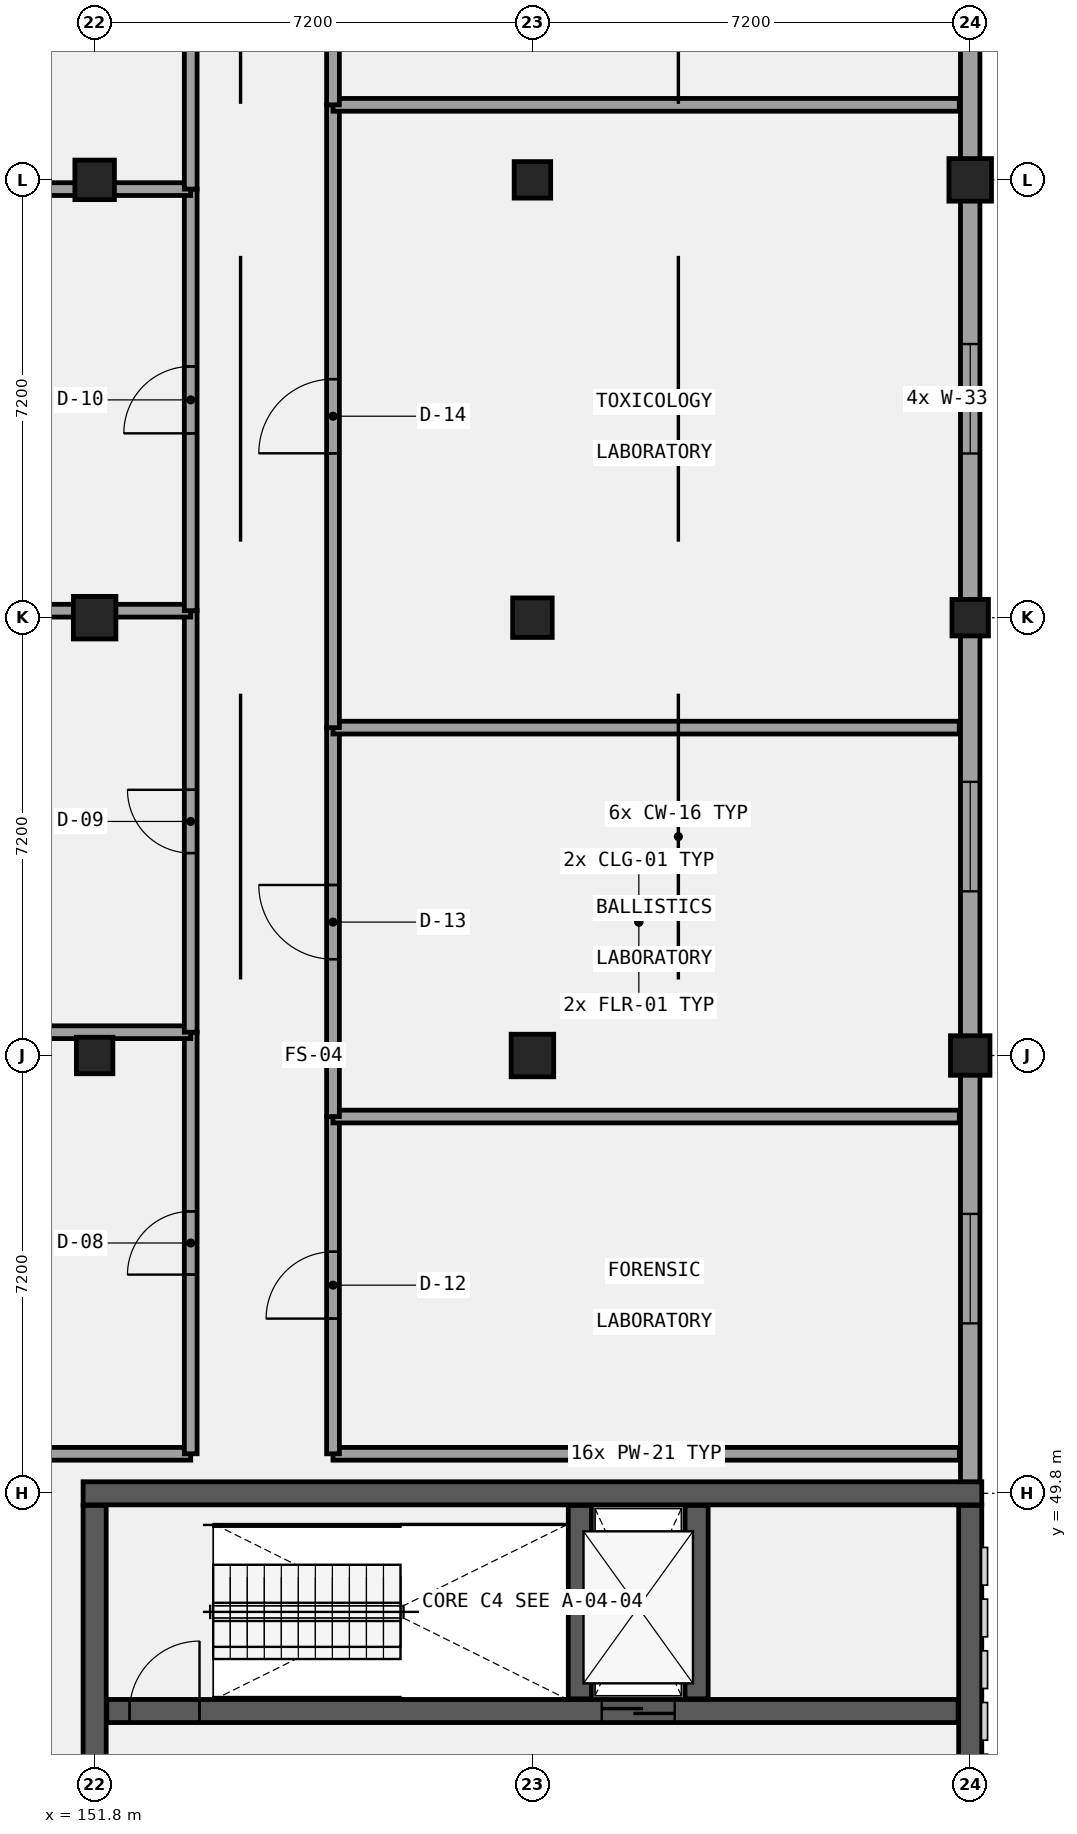
"""IFC4 building model, lengths in metres.
Left out: names, types, materials, properties, quantities, classifications, styles, units other than length and angle.
Written with IfcOpenShell. Run it as: python <this file> out.ifc"""

import sys

from ifc_helpers import new_model, si_unit, direction, frame, frame_2d, origin, origin_2d, place, context, subcontext, project, spatial, rectangle, extrude, element, fill, save


model = new_model("IFC4")
c1 = context("Model", 3, precision=1e-05, world=origin(), true_north=direction((0.0, 1.0)))
c2 = subcontext(c1, "Body", "Model", "MODEL_VIEW")
j1 = project(units=[si_unit("LENGTHUNIT", "METRE"), si_unit("PLANEANGLEUNIT", "RADIAN")], contexts=[c1])
p1 = place(None, origin())
s1 = spatial("IfcSite", under=j1, at=p1, CompositionType="ELEMENT")
p2 = place(p1, origin())
s2 = spatial("IfcBuilding", under=s1, at=p2, CompositionType="ELEMENT")
p3 = place(p2, frame((0.0, 0.0, 9.6)))
s3 = spatial("IfcBuildingStorey", under=s2, at=p3, CompositionType="ELEMENT", Elevation=9.6)
p4 = place(p3, frame((151.61, 49.8, 0.0), z_axis=(0.0, 0.0, 1.0), x_axis=(1.0, 0.0, 0.0)))
e1 = element("IfcWall", 1, at=p4, inside=s3, PredefinedType="SHEAR", context=c2, shape_type="SweptSolid", body=[
    extrude(rectangle(XDim=14.78, YDim=0.38, at=frame_2d((7.39, 0.0))), origin(), (0.0, 0.0, 1.0), 4.2),
])
for number, where, z_axis, x_axis in (
    (2, (151.8, 42.8, 0.0), (0.0, 0.0, 1.0), (0.0, 1.0, 0.0)),
    (3, (166.2, 42.8, 0.0), (0.0, 0.0, 1.0), (0.0, 1.0, 0.0)),
):
    element("IfcWall", number, at=place(p3, frame(where, z_axis=z_axis, x_axis=x_axis)), inside=s3, PredefinedType="SHEAR", context=c2, shape_type="SweptSolid", body=[
        extrude(rectangle(XDim=6.8, YDim=0.38, at=frame_2d((3.4, 0.0))), origin(), (0.0, 0.0, 1.0), 4.2),
    ])
p5 = place(p3, frame((152.0, 46.22, 0.0), z_axis=(0.0, 0.0, 1.0), x_axis=(1.0, 0.0, 0.0)))
e4 = element("IfcWall", 4, at=p5, inside=s3, PredefinedType="SHEAR", context=c2, shape_type="SweptSolid", body=[
    extrude(rectangle(XDim=14.0, YDim=0.38, at=frame_2d((7.0, 0.0))), origin(), (0.0, 0.0, 1.0), 4.2),
])
p6 = place(p5, frame((8.14, 0.0, 0.0)))
e5 = element("IfcOpeningElement", 5, at=p6, cuts=e4, PredefinedType="OPENING", context=c2, shape_type="SweptSolid", body=[
    extrude(rectangle(XDim=1.2, YDim=2.15, at=frame_2d((0.6, 1.075))), frame((0.0, 0.2, 0.0), z_axis=(0.0, -1.0, 0.0), x_axis=(1.0, 0.0, 0.0)), (0.0, 0.0, 1.0), 0.4),
])
p7 = place(p5, frame((0.375, 0.0, 0.0)))
e6 = element("IfcOpeningElement", 6, at=p7, cuts=e4, PredefinedType="OPENING", context=c2, shape_type="SweptSolid", body=[
    extrude(rectangle(XDim=1.15, YDim=2.15, at=frame_2d((0.575, 1.075))), frame((0.0, 0.2, 0.0), z_axis=(0.0, -1.0, 0.0), x_axis=(1.0, 0.0, 0.0)), (0.0, 0.0, 1.0), 0.4),
])
for number, where, z_axis, x_axis in (
    (7, (159.78, 46.42, 0.0), (0.0, 0.0, 1.0), (0.0, 1.0, 0.0)),
    (8, (161.7, 46.42, 0.0), (0.0, 0.0, 1.0), (0.0, 1.0, 0.0)),
):
    element("IfcWall", number, at=place(p3, frame(where, z_axis=z_axis, x_axis=x_axis)), inside=s3, PredefinedType="SHEAR", context=c2, shape_type="SweptSolid", body=[
        extrude(rectangle(XDim=3.18, YDim=0.38, at=frame_2d((1.59, 0.0))), origin(), (0.0, 0.0, 1.0), 4.2),
    ])
p8 = place(p3, frame((151.8, 57.0, 0.0), z_axis=(0.0, 0.0, 1.0), x_axis=(1.0, 0.0, 0.0)))
e9 = element("IfcColumn", 9, at=p8, inside=s3, PredefinedType="COLUMN", context=c2, shape_type="SweptSolid", body=[
    extrude(rectangle(XDim=0.6, YDim=0.6, at=origin_2d()), origin(), (0.0, 0.0, 1.0), 4.2),
])
p9 = place(p3, frame((151.8, 64.2, 0.0), z_axis=(0.0, 0.0, 1.0), x_axis=(1.0, 0.0, 0.0)))
e10 = element("IfcColumn", 10, at=p9, inside=s3, PredefinedType="COLUMN", context=c2, shape_type="SweptSolid", body=[
    extrude(rectangle(XDim=0.7, YDim=0.7, at=origin_2d()), origin(), (0.0, 0.0, 1.0), 4.2),
])
p10 = place(p3, frame((151.8, 71.4, 0.0), z_axis=(0.0, 0.0, 1.0), x_axis=(1.0, 0.0, 0.0)))
e11 = element("IfcColumn", 11, at=p10, inside=s3, PredefinedType="COLUMN", context=c2, shape_type="SweptSolid", body=[
    extrude(rectangle(XDim=0.65, YDim=0.65, at=origin_2d()), origin(), (0.0, 0.0, 1.0), 4.2),
])
p11 = place(p3, frame((159.0, 57.0, 0.0), z_axis=(0.0, 0.0, 1.0), x_axis=(1.0, 0.0, 0.0)))
e12 = element("IfcColumn", 12, at=p11, inside=s3, PredefinedType="COLUMN", context=c2, shape_type="SweptSolid", body=[
    extrude(rectangle(XDim=0.7, YDim=0.7, at=origin_2d()), origin(), (0.0, 0.0, 1.0), 4.2),
])
p12 = place(p3, frame((159.0, 64.2, 0.0), z_axis=(0.0, 0.0, 1.0), x_axis=(1.0, 0.0, 0.0)))
e13 = element("IfcColumn", 13, at=p12, inside=s3, PredefinedType="COLUMN", context=c2, shape_type="SweptSolid", body=[
    extrude(rectangle(XDim=0.65, YDim=0.65, at=origin_2d()), origin(), (0.0, 0.0, 1.0), 4.2),
])
p13 = place(p3, frame((159.0, 71.4, 0.0), z_axis=(0.0, 0.0, 1.0), x_axis=(1.0, 0.0, 0.0)))
e14 = element("IfcColumn", 14, at=p13, inside=s3, PredefinedType="COLUMN", context=c2, shape_type="SweptSolid", body=[
    extrude(rectangle(XDim=0.6, YDim=0.6, at=origin_2d()), origin(), (0.0, 0.0, 1.0), 4.2),
])
p14 = place(p3, frame((166.2, 57.0, 0.0), z_axis=(0.0, 0.0, 1.0), x_axis=(1.0, 0.0, 0.0)))
e15 = element("IfcColumn", 15, at=p14, inside=s3, PredefinedType="COLUMN", context=c2, shape_type="SweptSolid", body=[
    extrude(rectangle(XDim=0.65, YDim=0.65, at=origin_2d()), origin(), (0.0, 0.0, 1.0), 4.2),
])
p15 = place(p3, frame((166.2, 64.2, 0.0), z_axis=(0.0, 0.0, 1.0), x_axis=(1.0, 0.0, 0.0)))
e16 = element("IfcColumn", 16, at=p15, inside=s3, PredefinedType="COLUMN", context=c2, shape_type="SweptSolid", body=[
    extrude(rectangle(XDim=0.6, YDim=0.6, at=origin_2d()), origin(), (0.0, 0.0, 1.0), 4.2),
])
p16 = place(p3, frame((166.2, 71.4, 0.0), z_axis=(0.0, 0.0, 1.0), x_axis=(1.0, 0.0, 0.0)))
e17 = element("IfcColumn", 17, at=p16, inside=s3, PredefinedType="COLUMN", context=c2, shape_type="SweptSolid", body=[
    extrude(rectangle(XDim=0.7, YDim=0.7, at=origin_2d()), origin(), (0.0, 0.0, 1.0), 4.2),
])
p17 = place(p3, frame((166.2, 49.99, 0.0), z_axis=(0.0, 0.0, 1.0), x_axis=(0.0, 1.0, 0.0)))
e18 = element("IfcWall", 18, at=p17, inside=s3, PredefinedType="SOLIDWALL", context=c2, shape_type="SweptSolid", body=[
    extrude(rectangle(XDim=28.45, YDim=0.32, at=frame_2d((14.225, 0.0))), origin(), (0.0, 0.0, 1.0), 3.19),
])
p18 = place(p17, frame((2.605, 0.0, 1.0)))
e19 = element("IfcOpeningElement", 19, at=p18, cuts=e18, PredefinedType="OPENING", context=c2, shape_type="SweptSolid", body=[
    extrude(rectangle(XDim=1.8, YDim=1.9, at=frame_2d((0.9, 0.95))), frame((0.0, 0.17, 0.0), z_axis=(0.0, -1.0, 0.0), x_axis=(1.0, 0.0, 0.0)), (0.0, 0.0, 1.0), 0.34),
])
p19 = place(p17, frame((9.71, 0.0, 1.0)))
e20 = element("IfcOpeningElement", 20, at=p19, cuts=e18, PredefinedType="OPENING", context=c2, shape_type="SweptSolid", body=[
    extrude(rectangle(XDim=1.8, YDim=1.9, at=frame_2d((0.9, 0.95))), frame((0.0, 0.17, 0.0), z_axis=(0.0, -1.0, 0.0), x_axis=(1.0, 0.0, 0.0)), (0.0, 0.0, 1.0), 0.34),
])
p20 = place(p17, frame((16.91, 0.0, 1.0)))
e21 = element("IfcOpeningElement", 21, at=p20, cuts=e18, PredefinedType="OPENING", context=c2, shape_type="SweptSolid", body=[
    extrude(rectangle(XDim=1.8, YDim=1.9, at=frame_2d((0.9, 0.95))), frame((0.0, 0.17, 0.0), z_axis=(0.0, -1.0, 0.0), x_axis=(1.0, 0.0, 0.0)), (0.0, 0.0, 1.0), 0.34),
])
p21 = place(p17, frame((24.03, 0.0, 1.0)))
e22 = element("IfcOpeningElement", 22, at=p21, cuts=e18, PredefinedType="OPENING", context=c2, shape_type="SweptSolid", body=[
    extrude(rectangle(XDim=1.8, YDim=1.9, at=frame_2d((0.9, 0.95))), frame((0.0, 0.17, 0.0), z_axis=(0.0, -1.0, 0.0), x_axis=(1.0, 0.0, 0.0)), (0.0, 0.0, 1.0), 0.34),
])
p22 = place(p3, frame((144.78, 50.45, 0.0), z_axis=(0.0, 0.0, 1.0), x_axis=(1.0, 0.0, 0.0)))
e23 = element("IfcWall", 23, at=p22, inside=s3, PredefinedType="PARTITIONING", context=c2, shape_type="SweptSolid", body=[
    extrude(rectangle(XDim=8.6, YDim=0.21, at=frame_2d((4.3, 0.0))), origin(), (0.0, 0.0, 1.0), 3.94),
])
p23 = place(p3, frame((153.38, 50.45, 0.0), z_axis=(0.0, 0.0, 1.0), x_axis=(0.0, 1.0, 0.0)))
e24 = element("IfcWall", 24, at=p23, inside=s3, PredefinedType="PARTITIONING", context=c2, shape_type="SweptSolid", body=[
    extrude(rectangle(XDim=6.933, YDim=0.21, at=frame_2d((3.467, 0.0))), origin(), (0.0, 0.0, 1.0), 3.94),
])
p24 = place(p23, frame((2.947, 0.0, 0.0)))
e25 = element("IfcOpeningElement", 25, at=p24, cuts=e24, PredefinedType="OPENING", context=c2, shape_type="SweptSolid", body=[
    extrude(rectangle(XDim=1.04, YDim=2.22, at=frame_2d((0.52, 1.11))), frame((0.0, 0.115, 0.0), z_axis=(0.0, -1.0, 0.0), x_axis=(1.0, 0.0, 0.0)), (0.0, 0.0, 1.0), 0.23),
])
p25 = place(p3, frame((144.78, 57.383, 0.0), z_axis=(0.0, 0.0, 1.0), x_axis=(1.0, 0.0, 0.0)))
e26 = element("IfcWall", 26, at=p25, inside=s3, PredefinedType="PARTITIONING", context=c2, shape_type="SweptSolid", body=[
    extrude(rectangle(XDim=8.6, YDim=0.21, at=frame_2d((4.3, 0.0))), origin(), (0.0, 0.0, 1.0), 3.09),
])
p26 = place(p3, frame((153.38, 57.383, 0.0), z_axis=(0.0, 0.0, 1.0), x_axis=(0.0, 1.0, 0.0)))
e27 = element("IfcWall", 27, at=p26, inside=s3, PredefinedType="PARTITIONING", context=c2, shape_type="SweptSolid", body=[
    extrude(rectangle(XDim=6.932, YDim=0.21, at=frame_2d((3.466, 0.0))), origin(), (0.0, 0.0, 1.0), 3.94),
])
p27 = place(p26, frame((2.946, 0.0, 0.0)))
e28 = element("IfcOpeningElement", 28, at=p27, cuts=e27, PredefinedType="OPENING", context=c2, shape_type="SweptSolid", body=[
    extrude(rectangle(XDim=1.04, YDim=2.35, at=frame_2d((0.52, 1.175))), frame((0.0, 0.115, 0.0), z_axis=(0.0, -1.0, 0.0), x_axis=(1.0, 0.0, 0.0)), (0.0, 0.0, 1.0), 0.23),
])
p28 = place(p3, frame((144.78, 64.315, 0.0), z_axis=(0.0, 0.0, 1.0), x_axis=(1.0, 0.0, 0.0)))
e29 = element("IfcWall", 29, at=p28, inside=s3, PredefinedType="PARTITIONING", context=c2, shape_type="SweptSolid", body=[
    extrude(rectangle(XDim=8.6, YDim=0.21, at=frame_2d((4.3, 0.0))), origin(), (0.0, 0.0, 1.0), 3.04),
])
p29 = place(p3, frame((153.38, 64.315, 0.0), z_axis=(0.0, 0.0, 1.0), x_axis=(0.0, 1.0, 0.0)))
e30 = element("IfcWall", 30, at=p29, inside=s3, PredefinedType="PARTITIONING", context=c2, shape_type="SweptSolid", body=[
    extrude(rectangle(XDim=6.933, YDim=0.21, at=frame_2d((3.467, 0.0))), origin(), (0.0, 0.0, 1.0), 3.94),
])
p30 = place(p29, frame((2.917, 0.0, 0.0)))
e31 = element("IfcOpeningElement", 31, at=p30, cuts=e30, PredefinedType="OPENING", context=c2, shape_type="SweptSolid", body=[
    extrude(rectangle(XDim=1.1, YDim=2.1, at=frame_2d((0.55, 1.05))), frame((0.0, 0.115, 0.0), z_axis=(0.0, -1.0, 0.0), x_axis=(1.0, 0.0, 0.0)), (0.0, 0.0, 1.0), 0.23),
])
p31 = place(p3, frame((144.78, 71.248, 0.0), z_axis=(0.0, 0.0, 1.0), x_axis=(1.0, 0.0, 0.0)))
e32 = element("IfcWall", 32, at=p31, inside=s3, PredefinedType="PARTITIONING", context=c2, shape_type="SweptSolid", body=[
    extrude(rectangle(XDim=8.6, YDim=0.21, at=frame_2d((4.3, 0.0))), origin(), (0.0, 0.0, 1.0), 2.94),
])
p32 = place(p3, frame((153.38, 71.248, 0.0), z_axis=(0.0, 0.0, 1.0), x_axis=(0.0, 1.0, 0.0)))
e33 = element("IfcWall", 33, at=p32, inside=s3, PredefinedType="PARTITIONING", context=c2, shape_type="SweptSolid", body=[
    extrude(rectangle(XDim=6.932, YDim=0.21, at=frame_2d((3.466, 0.0))), origin(), (0.0, 0.0, 1.0), 3.94),
])
p33 = place(p32, frame((2.916, 0.0, 0.0)))
e34 = element("IfcOpeningElement", 34, at=p33, cuts=e33, PredefinedType="OPENING", context=c2, shape_type="SweptSolid", body=[
    extrude(rectangle(XDim=1.1, YDim=2.22, at=frame_2d((0.55, 1.11))), frame((0.0, 0.115, 0.0), z_axis=(0.0, -1.0, 0.0), x_axis=(1.0, 0.0, 0.0)), (0.0, 0.0, 1.0), 0.23),
])
p34 = place(p3, frame((155.72, 50.45, 0.0), z_axis=(0.0, 0.0, 1.0), x_axis=(1.0, 0.0, 0.0)))
e35 = element("IfcWall", 35, at=p34, inside=s3, PredefinedType="PARTITIONING", context=c2, shape_type="SweptSolid", body=[
    extrude(rectangle(XDim=10.3, YDim=0.21, at=frame_2d((5.15, 0.0))), origin(), (0.0, 0.0, 1.0), 3.94),
])
p35 = place(p3, frame((155.72, 50.45, 0.0), z_axis=(0.0, 0.0, 1.0), x_axis=(0.0, 1.0, 0.0)))
e36 = element("IfcWall", 36, at=p35, inside=s3, PredefinedType="PARTITIONING", context=c2, shape_type="SweptSolid", body=[
    extrude(rectangle(XDim=5.546, YDim=0.21, at=frame_2d((2.773, 0.0))), origin(), (0.0, 0.0, 1.0), 3.94),
])
p36 = place(p35, frame((2.223, 0.0, 0.0)))
e37 = element("IfcOpeningElement", 37, at=p36, cuts=e36, PredefinedType="OPENING", context=c2, shape_type="SweptSolid", body=[
    extrude(rectangle(XDim=1.1, YDim=2.35, at=frame_2d((0.55, 1.175))), frame((0.0, 0.115, 0.0), z_axis=(0.0, -1.0, 0.0), x_axis=(1.0, 0.0, 0.0)), (0.0, 0.0, 1.0), 0.23),
])
p37 = place(p3, frame((155.72, 55.996, 0.0), z_axis=(0.0, 0.0, 1.0), x_axis=(1.0, 0.0, 0.0)))
e38 = element("IfcWall", 38, at=p37, inside=s3, PredefinedType="PARTITIONING", context=c2, shape_type="SweptSolid", body=[
    extrude(rectangle(XDim=10.3, YDim=0.21, at=frame_2d((5.15, 0.0))), origin(), (0.0, 0.0, 1.0), 3.94),
])
p38 = place(p3, frame((155.72, 55.996, 0.0), z_axis=(0.0, 0.0, 1.0), x_axis=(0.0, 1.0, 0.0)))
e39 = element("IfcWall", 39, at=p38, inside=s3, PredefinedType="PARTITIONING", context=c2, shape_type="SweptSolid", body=[
    extrude(rectangle(XDim=6.396, YDim=0.21, at=frame_2d((3.198, 0.0))), origin(), (0.0, 0.0, 1.0), 3.94),
])
p39 = place(p38, frame((2.588, 0.0, 0.0)))
e40 = element("IfcOpeningElement", 40, at=p39, cuts=e39, PredefinedType="OPENING", context=c2, shape_type="SweptSolid", body=[
    extrude(rectangle(XDim=1.22, YDim=2.1, at=frame_2d((0.61, 1.05))), frame((0.0, 0.115, 0.0), z_axis=(0.0, -1.0, 0.0), x_axis=(1.0, 0.0, 0.0)), (0.0, 0.0, 1.0), 0.23),
])
p40 = place(p3, frame((155.72, 62.392, 0.0), z_axis=(0.0, 0.0, 1.0), x_axis=(1.0, 0.0, 0.0)))
e41 = element("IfcWall", 41, at=p40, inside=s3, PredefinedType="PARTITIONING", context=c2, shape_type="SweptSolid", body=[
    extrude(rectangle(XDim=10.3, YDim=0.21, at=frame_2d((5.15, 0.0))), origin(), (0.0, 0.0, 1.0), 3.39),
])
p41 = place(p3, frame((155.72, 62.392, 0.0), z_axis=(0.0, 0.0, 1.0), x_axis=(0.0, 1.0, 0.0)))
e42 = element("IfcWall", 42, at=p41, inside=s3, PredefinedType="PARTITIONING", context=c2, shape_type="SweptSolid", body=[
    extrude(rectangle(XDim=10.242, YDim=0.21, at=frame_2d((5.121, 0.0))), origin(), (0.0, 0.0, 1.0), 3.94),
])
p42 = place(p41, frame((4.511, 0.0, 0.0)))
e43 = element("IfcOpeningElement", 43, at=p42, cuts=e42, PredefinedType="OPENING", context=c2, shape_type="SweptSolid", body=[
    extrude(rectangle(XDim=1.22, YDim=2.22, at=frame_2d((0.61, 1.11))), frame((0.0, 0.115, 0.0), z_axis=(0.0, -1.0, 0.0), x_axis=(1.0, 0.0, 0.0)), (0.0, 0.0, 1.0), 0.23),
])
p43 = place(p3, frame((155.72, 72.634, 0.0), z_axis=(0.0, 0.0, 1.0), x_axis=(1.0, 0.0, 0.0)))
e44 = element("IfcWall", 44, at=p43, inside=s3, PredefinedType="PARTITIONING", context=c2, shape_type="SweptSolid", body=[
    extrude(rectangle(XDim=10.3, YDim=0.21, at=frame_2d((5.15, 0.0))), origin(), (0.0, 0.0, 1.0), 3.94),
])
p44 = place(p3, frame((155.72, 72.634, 0.0), z_axis=(0.0, 0.0, 1.0), x_axis=(0.0, 1.0, 0.0)))
e45 = element("IfcWall", 45, at=p44, inside=s3, PredefinedType="PARTITIONING", context=c2, shape_type="SweptSolid", body=[
    extrude(rectangle(XDim=5.546, YDim=0.21, at=frame_2d((2.773, 0.0))), origin(), (0.0, 0.0, 1.0), 3.94),
])
p45 = place(p44, frame((2.163, 0.0, 0.0)))
e46 = element("IfcOpeningElement", 46, at=p45, cuts=e45, PredefinedType="OPENING", context=c2, shape_type="SweptSolid", body=[
    extrude(rectangle(XDim=1.22, YDim=2.35, at=frame_2d((0.61, 1.175))), frame((0.0, 0.115, 0.0), z_axis=(0.0, -1.0, 0.0), x_axis=(1.0, 0.0, 0.0)), (0.0, 0.0, 1.0), 0.23),
])
p46 = place(p6, frame((1.2, 0.0, 0.0), z_axis=(0.0, 0.0, 1.0), x_axis=(-1.0, 0.0, 0.0)))
e47 = element("IfcDoor", 47, at=p46, inside=s3, OperationType="DOUBLE_DOOR_SLIDING", PredefinedType="DOOR", context=c2, shape_type="SweptSolid", body=[
    extrude(rectangle(XDim=1.2, YDim=2.15, at=frame_2d((0.6, 1.075))), frame((0.0, 0.025, 0.0), z_axis=(0.0, -1.0, 0.0), x_axis=(1.0, 0.0, 0.0)), (0.0, 0.0, 1.0), 0.05),
])
fill(e5, e47)
p47 = place(p7, origin())
e48 = element("IfcDoor", 48, at=p47, inside=s3, OperationType="SINGLE_SWING_RIGHT", PredefinedType="DOOR", context=c2, shape_type="SweptSolid", body=[
    extrude(rectangle(XDim=1.15, YDim=2.15, at=frame_2d((0.575, 1.075))), frame((0.0, 0.025, 0.0), z_axis=(0.0, -1.0, 0.0), x_axis=(1.0, 0.0, 0.0)), (0.0, 0.0, 1.0), 0.05),
])
fill(e6, e48)
p48 = place(p18, origin())
e49 = element("IfcWindow", 49, at=p48, inside=s3, PartitioningType="SINGLE_PANEL", PredefinedType="WINDOW", context=c2, shape_type="SweptSolid", body=[
    extrude(rectangle(XDim=1.8, YDim=1.9, at=frame_2d((0.9, 0.95))), frame((0.0, 0.03, 0.0), z_axis=(0.0, -1.0, 0.0), x_axis=(1.0, 0.0, 0.0)), (0.0, 0.0, 1.0), 0.06),
])
fill(e19, e49)
p49 = place(p19, origin())
e50 = element("IfcWindow", 50, at=p49, inside=s3, PartitioningType="SINGLE_PANEL", PredefinedType="WINDOW", context=c2, shape_type="SweptSolid", body=[
    extrude(rectangle(XDim=1.8, YDim=1.9, at=frame_2d((0.9, 0.95))), frame((0.0, 0.03, 0.0), z_axis=(0.0, -1.0, 0.0), x_axis=(1.0, 0.0, 0.0)), (0.0, 0.0, 1.0), 0.06),
])
fill(e20, e50)
p50 = place(p20, origin())
e51 = element("IfcWindow", 51, at=p50, inside=s3, PartitioningType="SINGLE_PANEL", PredefinedType="WINDOW", context=c2, shape_type="SweptSolid", body=[
    extrude(rectangle(XDim=1.8, YDim=1.9, at=frame_2d((0.9, 0.95))), frame((0.0, 0.03, 0.0), z_axis=(0.0, -1.0, 0.0), x_axis=(1.0, 0.0, 0.0)), (0.0, 0.0, 1.0), 0.06),
])
fill(e21, e51)
p51 = place(p24, frame((1.04, 0.0, 0.0), z_axis=(0.0, 0.0, 1.0), x_axis=(-1.0, 0.0, 0.0)))
e52 = element("IfcDoor", 52, at=p51, inside=s3, OperationType="SINGLE_SWING_LEFT", PredefinedType="DOOR", context=c2, shape_type="SweptSolid", body=[
    extrude(rectangle(XDim=1.04, YDim=2.22, at=frame_2d((0.52, 1.11))), frame((0.0, 0.025, 0.0), z_axis=(0.0, -1.0, 0.0), x_axis=(1.0, 0.0, 0.0)), (0.0, 0.0, 1.0), 0.05),
])
fill(e25, e52)
p52 = place(p27, frame((1.04, 0.0, 0.0), z_axis=(0.0, 0.0, 1.0), x_axis=(-1.0, 0.0, 0.0)))
e53 = element("IfcDoor", 53, at=p52, inside=s3, OperationType="SINGLE_SWING_RIGHT", PredefinedType="DOOR", context=c2, shape_type="SweptSolid", body=[
    extrude(rectangle(XDim=1.04, YDim=2.35, at=frame_2d((0.52, 1.175))), frame((0.0, 0.025, 0.0), z_axis=(0.0, -1.0, 0.0), x_axis=(1.0, 0.0, 0.0)), (0.0, 0.0, 1.0), 0.05),
])
fill(e28, e53)
p53 = place(p30, frame((1.1, 0.0, 0.0), z_axis=(0.0, 0.0, 1.0), x_axis=(-1.0, 0.0, 0.0)))
e54 = element("IfcDoor", 54, at=p53, inside=s3, OperationType="SINGLE_SWING_LEFT", PredefinedType="DOOR", context=c2, shape_type="SweptSolid", body=[
    extrude(rectangle(XDim=1.1, YDim=2.1, at=frame_2d((0.55, 1.05))), frame((0.0, 0.025, 0.0), z_axis=(0.0, -1.0, 0.0), x_axis=(1.0, 0.0, 0.0)), (0.0, 0.0, 1.0), 0.05),
])
fill(e31, e54)
p54 = place(p36, origin())
e55 = element("IfcDoor", 55, at=p54, inside=s3, OperationType="SINGLE_SWING_LEFT", PredefinedType="DOOR", context=c2, shape_type="SweptSolid", body=[
    extrude(rectangle(XDim=1.1, YDim=2.35, at=frame_2d((0.55, 1.175))), frame((0.0, 0.025, 0.0), z_axis=(0.0, -1.0, 0.0), x_axis=(1.0, 0.0, 0.0)), (0.0, 0.0, 1.0), 0.05),
])
fill(e37, e55)
p55 = place(p39, origin())
e56 = element("IfcDoor", 56, at=p55, inside=s3, OperationType="SINGLE_SWING_RIGHT", PredefinedType="DOOR", context=c2, shape_type="SweptSolid", body=[
    extrude(rectangle(XDim=1.22, YDim=2.1, at=frame_2d((0.61, 1.05))), frame((0.0, 0.025, 0.0), z_axis=(0.0, -1.0, 0.0), x_axis=(1.0, 0.0, 0.0)), (0.0, 0.0, 1.0), 0.05),
])
fill(e40, e56)
p56 = place(p42, origin())
e57 = element("IfcDoor", 57, at=p56, inside=s3, OperationType="SINGLE_SWING_LEFT", PredefinedType="DOOR", context=c2, shape_type="SweptSolid", body=[
    extrude(rectangle(XDim=1.22, YDim=2.22, at=frame_2d((0.61, 1.11))), frame((0.0, 0.025, 0.0), z_axis=(0.0, -1.0, 0.0), x_axis=(1.0, 0.0, 0.0)), (0.0, 0.0, 1.0), 0.05),
])
fill(e43, e57)
save(model, sys.argv[1])
